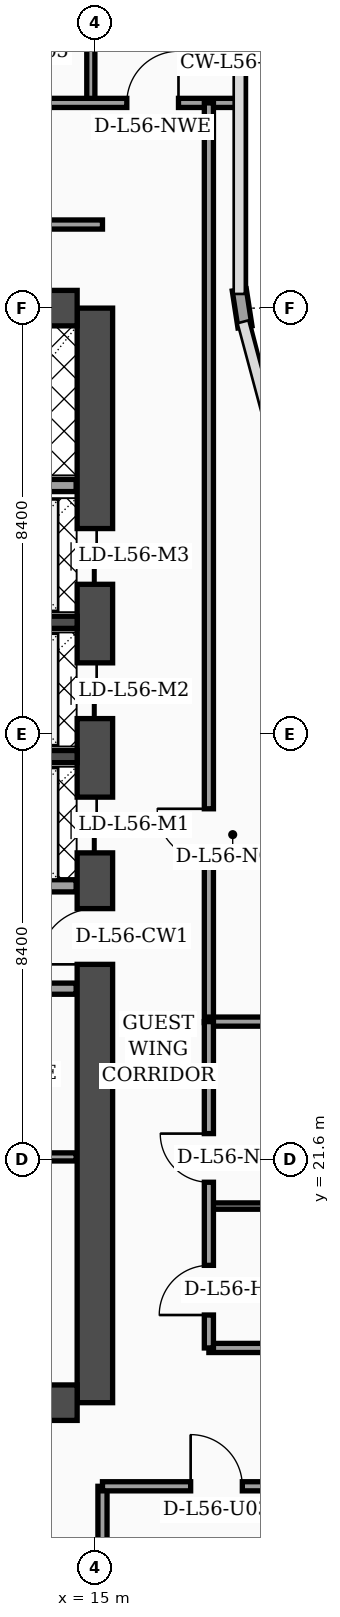
"""IFC4 building model, lengths in metres.
Left out: names, types, materials, properties, quantities, classifications, styles, units other than length and angle.
Written with IfcOpenShell. Run it as: python <this file> out.ifc"""

import sys

from ifc_helpers import new_model, si_unit, direction, frame, frame_2d, origin, place, context, subcontext, project, spatial, rectangle, extrude, element, fill, save


model = new_model("IFC4")
c1 = context("Model", 3, precision=1e-05, world=origin(), true_north=direction((0.0, 1.0)))
c2 = subcontext(c1, "Body", "Model", "MODEL_VIEW")
j1 = project(units=[si_unit("LENGTHUNIT", "METRE"), si_unit("PLANEANGLEUNIT", "RADIAN")], contexts=[c1])
p1 = place(None, origin())
s1 = spatial("IfcSite", under=j1, at=p1, CompositionType="ELEMENT")
p2 = place(p1, origin())
s2 = spatial("IfcBuilding", under=s1, at=p2, CompositionType="ELEMENT")
p3 = place(p2, frame((0.0, 0.0, 226.9)))
s3 = spatial("IfcBuildingStorey", under=s2, at=p3, CompositionType="ELEMENT", Elevation=226.9)
p4 = place(p3, frame((15.0, 16.8, 0.0), z_axis=(0.0, 0.0, 1.0), x_axis=(0.0, 1.0, 0.0)))
e1 = element("IfcWall", 1, at=p4, inside=s3, PredefinedType="SHEAR", context=c2, shape_type="SweptSolid", body=[
    extrude(rectangle(XDim=21.6, YDim=0.7, at=frame_2d((10.8, 0.0))), origin(), (0.0, 0.0, 1.0), 3.56),
])
p5 = place(p4, frame((8.65, 0.0, 0.0)))
e2 = element("IfcOpeningElement", 2, at=p5, cuts=e1, PredefinedType="OPENING", context=c2, shape_type="SweptSolid", body=[
    extrude(rectangle(XDim=1.1, YDim=2.2, at=frame_2d((0.55, 1.1))), frame((0.0, 0.36, 0.0), z_axis=(0.0, -1.0, 0.0), x_axis=(1.0, 0.0, 0.0)), (0.0, 0.0, 1.0), 0.72),
])
p6 = place(p4, frame((10.85, 0.0, 0.0)))
e3 = element("IfcOpeningElement", 3, at=p6, cuts=e1, PredefinedType="OPENING", context=c2, shape_type="SweptSolid", body=[
    extrude(rectangle(XDim=1.1, YDim=2.2, at=frame_2d((0.55, 1.1))), frame((0.0, 0.36, 0.0), z_axis=(0.0, -1.0, 0.0), x_axis=(1.0, 0.0, 0.0)), (0.0, 0.0, 1.0), 0.72),
])
p7 = place(p4, frame((13.5, 0.0, 0.0)))
e4 = element("IfcOpeningElement", 4, at=p7, cuts=e1, PredefinedType="OPENING", context=c2, shape_type="SweptSolid", body=[
    extrude(rectangle(XDim=1.1, YDim=2.2, at=frame_2d((0.55, 1.1))), frame((0.0, 0.36, 0.0), z_axis=(0.0, -1.0, 0.0), x_axis=(1.0, 0.0, 0.0)), (0.0, 0.0, 1.0), 0.72),
])
p8 = place(p4, frame((16.15, 0.0, 0.0)))
e5 = element("IfcOpeningElement", 5, at=p8, cuts=e1, PredefinedType="OPENING", context=c2, shape_type="SweptSolid", body=[
    extrude(rectangle(XDim=1.1, YDim=2.2, at=frame_2d((0.55, 1.1))), frame((0.0, 0.36, 0.0), z_axis=(0.0, -1.0, 0.0), x_axis=(1.0, 0.0, 0.0)), (0.0, 0.0, 1.0), 0.72),
])
for number, where, z_axis, x_axis in (
    (6, (4.55, 38.4, 0.0), (0.0, 0.0, 1.0), (1.0, 0.0, 0.0)),
    (7, (4.55, 16.8, 0.0), (0.0, 0.0, 1.0), (1.0, 0.0, 0.0)),
):
    element("IfcWall", number, at=place(p3, frame(where, z_axis=z_axis, x_axis=x_axis)), inside=s3, PredefinedType="SHEAR", context=c2, shape_type="SweptSolid", body=[
        extrude(rectangle(XDim=10.1, YDim=0.7, at=frame_2d((5.05, 0.0))), origin(), (0.0, 0.0, 1.0), 3.56),
    ])
for number, where, z_axis, x_axis in (
    (8, (12.18, 29.55, 0.0), (0.0, 0.0, 1.0), (1.0, 0.0, 0.0)),
    (9, (12.18, 32.2, 0.0), (0.0, 0.0, 1.0), (1.0, 0.0, 0.0)),
):
    element("IfcWall", number, at=place(p3, frame(where, z_axis=z_axis, x_axis=x_axis)), inside=s3, PredefinedType="SOLIDWALL", context=c2, shape_type="SweptSolid", body=[
        extrude(rectangle(XDim=2.47, YDim=0.24, at=frame_2d((1.235, 0.0))), origin(), (0.0, 0.0, 1.0), 3.56),
    ])
p9 = place(p3, frame((17.962, 38.03, 0.0), z_axis=(0.0, 0.0, 1.0), x_axis=(-0.15141125477, 0.988470855377, 0.0)))
e10 = element("IfcWall", 10, at=p9, inside=s3, PredefinedType="SOLIDWALL", context=c2, shape_type="SweptSolid", body=[
    extrude(rectangle(XDim=0.739, YDim=0.28, at=frame_2d((0.369, 0.0))), origin(), (0.0, 0.0, 1.0), 3.56),
])
p10 = place(p3, frame((9.68, 21.65, 0.0), z_axis=(0.0, 0.0, 1.0), x_axis=(1.0, 0.0, 0.0)))
e11 = element("IfcWall", 11, at=p10, inside=s3, PredefinedType="PARTITIONING", context=c2, shape_type="SweptSolid", body=[
    extrude(rectangle(XDim=4.95, YDim=0.16, at=frame_2d((2.475, 0.0))), origin(), (0.0, 0.0, 1.0), 3.09),
])
p11 = place(p10, frame((1.1, 0.0, 0.0)))
e12 = element("IfcOpeningElement", 12, at=p11, cuts=e11, PredefinedType="OPENING", context=c2, shape_type="SweptSolid", body=[
    extrude(rectangle(XDim=0.98, YDim=2.15, at=frame_2d((0.49, 1.075))), frame((0.0, 0.09, 0.0), z_axis=(0.0, -1.0, 0.0), x_axis=(1.0, 0.0, 0.0)), (0.0, 0.0, 1.0), 0.18),
])
p12 = place(p3, frame((9.68, 24.97, 0.0), z_axis=(0.0, 0.0, 1.0), x_axis=(1.0, 0.0, 0.0)))
e13 = element("IfcWall", 13, at=p12, inside=s3, PredefinedType="SOLIDWALL", context=c2, shape_type="SweptSolid", body=[
    extrude(rectangle(XDim=4.95, YDim=0.22, at=frame_2d((2.475, 0.0))), origin(), (0.0, 0.0, 1.0), 2.94),
])
p13 = place(p12, frame((0.9, 0.0, 0.0)))
e14 = element("IfcOpeningElement", 14, at=p13, cuts=e13, PredefinedType="OPENING", context=c2, shape_type="SweptSolid", body=[
    extrude(rectangle(XDim=0.98, YDim=2.15, at=frame_2d((0.49, 1.075))), frame((0.0, 0.12, 0.0), z_axis=(0.0, -1.0, 0.0), x_axis=(1.0, 0.0, 0.0)), (0.0, 0.0, 1.0), 0.24),
])
p14 = place(p3, frame((12.25, 27.0, 0.0), z_axis=(0.0, 0.0, 1.0), x_axis=(1.0, 0.0, 0.0)))
e15 = element("IfcWall", 15, at=p14, inside=s3, PredefinedType="SOLIDWALL", context=c2, shape_type="SweptSolid", body=[
    extrude(rectangle(XDim=2.38, YDim=0.24, at=frame_2d((1.19, 0.0))), origin(), (0.0, 0.0, 1.0), 3.56),
])
p15 = place(p3, frame((9.66, 34.9, 0.0), z_axis=(0.0, 0.0, 1.0), x_axis=(1.0, 0.0, 0.0)))
e16 = element("IfcWall", 16, at=p15, inside=s3, PredefinedType="SOLIDWALL", context=c2, shape_type="SweptSolid", body=[
    extrude(rectangle(XDim=4.97, YDim=0.24, at=frame_2d((2.485, 0.0))), origin(), (0.0, 0.0, 1.0), 3.56),
])
p16 = place(p3, frame((15.15, 2.44, 0.0), z_axis=(0.0, 0.0, 1.0), x_axis=(0.0, 1.0, 0.0)))
e17 = element("IfcWall", 17, at=p16, inside=s3, PredefinedType="PARTITIONING", context=c2, shape_type="SweptSolid", body=[
    extrude(rectangle(XDim=12.71, YDim=0.18, at=frame_2d((6.355, 0.0))), origin(), (0.0, 0.0, 1.0), 3.09),
])
p17 = place(p3, frame((15.15, 15.15, 0.0), z_axis=(0.0, 0.0, 1.0), x_axis=(1.0, 0.0, 0.0)))
e18 = element("IfcWall", 18, at=p17, inside=s3, PredefinedType="PARTITIONING", context=c2, shape_type="SweptSolid", body=[
    extrude(rectangle(XDim=6.45, YDim=0.18, at=frame_2d((3.225, 0.0))), origin(), (0.0, 0.0, 1.0), 2.59),
])
p18 = place(p17, frame((1.74, 0.0, 0.0)))
e19 = element("IfcOpeningElement", 19, at=p18, cuts=e18, PredefinedType="OPENING", context=c2, shape_type="SweptSolid", body=[
    extrude(rectangle(XDim=1.02, YDim=2.2, at=frame_2d((0.51, 1.1))), frame((0.0, 0.1, 0.0), z_axis=(0.0, -1.0, 0.0), x_axis=(1.0, 0.0, 0.0)), (0.0, 0.0, 1.0), 0.2),
])
p19 = place(p3, frame((14.92, 42.45, 0.0), z_axis=(0.0, 0.0, 1.0), x_axis=(0.0, 1.0, 0.0)))
e20 = element("IfcWall", 20, at=p19, inside=s3, PredefinedType="PARTITIONING", context=c2, shape_type="SweptSolid", body=[
    extrude(rectangle(XDim=5.35, YDim=0.16, at=frame_2d((2.675, 0.0))), origin(), (0.0, 0.0, 1.0), 3.09),
])
p20 = place(p3, frame((0.08, 42.45, 0.0), z_axis=(0.0, 0.0, 1.0), x_axis=(1.0, 0.0, 0.0)))
e21 = element("IfcWall", 21, at=p20, inside=s3, PredefinedType="PARTITIONING", context=c2, shape_type="SweptSolid", body=[
    extrude(rectangle(XDim=17.77, YDim=0.18, at=frame_2d((8.885, 0.0))), origin(), (0.0, 0.0, 1.0), 2.94),
])
p21 = place(p20, frame((0.9, 0.0, 0.0)))
e22 = element("IfcOpeningElement", 22, at=p21, cuts=e21, PredefinedType="OPENING", context=c2, shape_type="SweptSolid", body=[
    extrude(rectangle(XDim=1.02, YDim=2.2, at=frame_2d((0.51, 1.1))), frame((0.0, 0.1, 0.0), z_axis=(0.0, -1.0, 0.0), x_axis=(1.0, 0.0, 0.0)), (0.0, 0.0, 1.0), 0.2),
])
p22 = place(p20, frame((4.75, 0.0, 0.0)))
e23 = element("IfcOpeningElement", 23, at=p22, cuts=e21, PredefinedType="OPENING", context=c2, shape_type="SweptSolid", body=[
    extrude(rectangle(XDim=1.02, YDim=2.2, at=frame_2d((0.51, 1.1))), frame((0.0, 0.1, 0.0), z_axis=(0.0, -1.0, 0.0), x_axis=(1.0, 0.0, 0.0)), (0.0, 0.0, 1.0), 0.2),
])
p23 = place(p20, frame((10.63, 0.0, 0.0)))
e24 = element("IfcOpeningElement", 24, at=p23, cuts=e21, PredefinedType="OPENING", context=c2, shape_type="SweptSolid", body=[
    extrude(rectangle(XDim=1.02, YDim=2.2, at=frame_2d((0.51, 1.1))), frame((0.0, 0.1, 0.0), z_axis=(0.0, -1.0, 0.0), x_axis=(1.0, 0.0, 0.0)), (0.0, 0.0, 1.0), 0.2),
])
p24 = place(p20, frame((15.55, 0.0, 0.0)))
e25 = element("IfcOpeningElement", 25, at=p24, cuts=e21, PredefinedType="OPENING", context=c2, shape_type="SweptSolid", body=[
    extrude(rectangle(XDim=1.02, YDim=2.2, at=frame_2d((0.51, 1.1))), frame((0.0, 0.1, 0.0), z_axis=(0.0, -1.0, 0.0), x_axis=(1.0, 0.0, 0.0)), (0.0, 0.0, 1.0), 0.2),
])
p25 = place(p3, frame((17.25, 24.3, 0.0), z_axis=(0.0, 0.0, 1.0), x_axis=(0.0, 1.0, 0.0)))
e26 = element("IfcWall", 26, at=p25, inside=s3, PredefinedType="PARTITIONING", context=c2, shape_type="SweptSolid", body=[
    extrude(rectangle(XDim=18.15, YDim=0.18, at=frame_2d((9.075, 0.0))), origin(), (0.0, 0.0, 1.0), 2.94),
])
p26 = place(p25, frame((3.2, 0.0, 0.0)))
e27 = element("IfcOpeningElement", 27, at=p26, cuts=e26, PredefinedType="OPENING", context=c2, shape_type="SweptSolid", body=[
    extrude(rectangle(XDim=1.02, YDim=2.2, at=frame_2d((0.51, 1.1))), frame((0.0, 0.1, 0.0), z_axis=(0.0, -1.0, 0.0), x_axis=(1.0, 0.0, 0.0)), (0.0, 0.0, 1.0), 0.2),
])
p27 = place(p3, frame((3.83, 40.05, 0.0), z_axis=(0.0, 0.0, 1.0), x_axis=(1.0, 0.0, 0.0)))
e28 = element("IfcWall", 28, at=p27, inside=s3, PredefinedType="PARTITIONING", context=c2, shape_type="SweptSolid", body=[
    extrude(rectangle(XDim=11.32, YDim=0.18, at=frame_2d((5.66, 0.0))), origin(), (0.0, 0.0, 1.0), 2.94),
])
p28 = place(p3, frame((17.25, 17.88, 0.0), z_axis=(0.0, 0.0, 1.0), x_axis=(1.0, 0.0, 0.0)))
e29 = element("IfcWall", 29, at=p28, inside=s3, PredefinedType="PARTITIONING", context=c2, shape_type="SweptSolid", body=[
    extrude(rectangle(XDim=4.3, YDim=0.18, at=frame_2d((2.15, 0.0))), origin(), (0.0, 0.0, 1.0), 3.56),
])
p29 = place(p3, frame((17.25, 20.68, 0.0), z_axis=(0.0, 0.0, 1.0), x_axis=(1.0, 0.0, 0.0)))
e30 = element("IfcWall", 30, at=p29, inside=s3, PredefinedType="PARTITIONING", context=c2, shape_type="SweptSolid", body=[
    extrude(rectangle(XDim=4.3, YDim=0.125, at=frame_2d((2.15, 0.0))), origin(), (0.0, 0.0, 1.0), 3.56),
])
p30 = place(p3, frame((17.25, 24.32, 0.0), z_axis=(0.0, 0.0, 1.0), x_axis=(1.0, 0.0, 0.0)))
e31 = element("IfcWall", 31, at=p30, inside=s3, PredefinedType="PARTITIONING", context=c2, shape_type="SweptSolid", body=[
    extrude(rectangle(XDim=4.35, YDim=0.18, at=frame_2d((2.175, 0.0))), origin(), (0.0, 0.0, 1.0), 3.56),
])
p31 = place(p3, frame((17.25, 17.88, 0.0), z_axis=(0.0, 0.0, 1.0), x_axis=(0.0, 1.0, 0.0)))
e32 = element("IfcWall", 32, at=p31, inside=s3, PredefinedType="PARTITIONING", context=c2, shape_type="SweptSolid", body=[
    extrude(rectangle(XDim=6.44, YDim=0.18, at=frame_2d((3.22, 0.0))), origin(), (0.0, 0.0, 1.0), 3.09),
])
p32 = place(p31, frame((0.65, 0.0, 0.0)))
e33 = element("IfcOpeningElement", 33, at=p32, cuts=e32, PredefinedType="OPENING", context=c2, shape_type="SweptSolid", body=[
    extrude(rectangle(XDim=0.98, YDim=2.15, at=frame_2d((0.49, 1.075))), frame((0.0, 0.1, 0.0), z_axis=(0.0, -1.0, 0.0), x_axis=(1.0, 0.0, 0.0)), (0.0, 0.0, 1.0), 0.2),
])
p33 = place(p31, frame((3.27, 0.0, 0.0)))
e34 = element("IfcOpeningElement", 34, at=p33, cuts=e32, PredefinedType="OPENING", context=c2, shape_type="SweptSolid", body=[
    extrude(rectangle(XDim=0.96, YDim=2.2, at=frame_2d((0.48, 1.1))), frame((0.0, 0.1, 0.0), z_axis=(0.0, -1.0, 0.0), x_axis=(1.0, 0.0, 0.0)), (0.0, 0.0, 1.0), 0.2),
])
p34 = place(p18, origin())
e35 = element("IfcDoor", 35, at=p34, inside=s3, OperationType="SINGLE_SWING_LEFT", PredefinedType="DOOR", context=c2, shape_type="SweptSolid", body=[
    extrude(rectangle(XDim=1.02, YDim=2.2, at=frame_2d((0.51, 1.1))), frame((0.0, 0.025, 0.0), z_axis=(0.0, -1.0, 0.0), x_axis=(1.0, 0.0, 0.0)), (0.0, 0.0, 1.0), 0.05),
])
fill(e19, e35)
p35 = place(p24, origin())
e36 = element("IfcDoor", 36, at=p35, inside=s3, OperationType="SINGLE_SWING_RIGHT", PredefinedType="DOOR", context=c2, shape_type="SweptSolid", body=[
    extrude(rectangle(XDim=1.02, YDim=2.2, at=frame_2d((0.51, 1.1))), frame((0.0, 0.025, 0.0), z_axis=(0.0, -1.0, 0.0), x_axis=(1.0, 0.0, 0.0)), (0.0, 0.0, 1.0), 0.05),
])
fill(e25, e36)
p36 = place(p26, origin())
e37 = element("IfcDoor", 37, at=p36, inside=s3, OperationType="SINGLE_SWING_RIGHT", PredefinedType="DOOR", context=c2, shape_type="SweptSolid", body=[
    extrude(rectangle(XDim=1.02, YDim=2.2, at=frame_2d((0.51, 1.1))), frame((0.0, 0.025, 0.0), z_axis=(0.0, -1.0, 0.0), x_axis=(1.0, 0.0, 0.0)), (0.0, 0.0, 1.0), 0.05),
])
fill(e27, e37)
p37 = place(p32, origin())
e38 = element("IfcDoor", 38, at=p37, inside=s3, OperationType="SINGLE_SWING_LEFT", PredefinedType="DOOR", context=c2, shape_type="SweptSolid", body=[
    extrude(rectangle(XDim=0.98, YDim=2.15, at=frame_2d((0.49, 1.075))), frame((0.0, 0.025, 0.0), z_axis=(0.0, -1.0, 0.0), x_axis=(1.0, 0.0, 0.0)), (0.0, 0.0, 1.0), 0.05),
])
fill(e33, e38)
p38 = place(p33, origin())
e39 = element("IfcDoor", 39, at=p38, inside=s3, OperationType="SINGLE_SWING_RIGHT", PredefinedType="DOOR", context=c2, shape_type="SweptSolid", body=[
    extrude(rectangle(XDim=0.96, YDim=2.2, at=frame_2d((0.48, 1.1))), frame((0.0, 0.025, 0.0), z_axis=(0.0, -1.0, 0.0), x_axis=(1.0, 0.0, 0.0)), (0.0, 0.0, 1.0), 0.05),
])
fill(e34, e39)
p39 = place(p5, origin())
e40 = element("IfcDoor", 40, at=p39, inside=s3, OperationType="SINGLE_SWING_LEFT", PredefinedType="DOOR", context=c2, shape_type="SweptSolid", body=[
    extrude(rectangle(XDim=1.1, YDim=2.2, at=frame_2d((0.55, 1.1))), frame((0.0, 0.025, 0.0), z_axis=(0.0, -1.0, 0.0), x_axis=(1.0, 0.0, 0.0)), (0.0, 0.0, 1.0), 0.05),
])
fill(e2, e40)
p40 = place(p6, origin())
e41 = element("IfcDoor", 41, at=p40, inside=s3, OperationType="DOUBLE_DOOR_SLIDING", PredefinedType="DOOR", context=c2, shape_type="SweptSolid", body=[
    extrude(rectangle(XDim=1.1, YDim=2.2, at=frame_2d((0.55, 1.1))), frame((0.0, 0.025, 0.0), z_axis=(0.0, -1.0, 0.0), x_axis=(1.0, 0.0, 0.0)), (0.0, 0.0, 1.0), 0.05),
])
fill(e3, e41)
p41 = place(p7, origin())
e42 = element("IfcDoor", 42, at=p41, inside=s3, OperationType="DOUBLE_DOOR_SLIDING", PredefinedType="DOOR", context=c2, shape_type="SweptSolid", body=[
    extrude(rectangle(XDim=1.1, YDim=2.2, at=frame_2d((0.55, 1.1))), frame((0.0, 0.025, 0.0), z_axis=(0.0, -1.0, 0.0), x_axis=(1.0, 0.0, 0.0)), (0.0, 0.0, 1.0), 0.05),
])
fill(e4, e42)
p42 = place(p8, origin())
e43 = element("IfcDoor", 43, at=p42, inside=s3, OperationType="DOUBLE_DOOR_SLIDING", PredefinedType="DOOR", context=c2, shape_type="SweptSolid", body=[
    extrude(rectangle(XDim=1.1, YDim=2.2, at=frame_2d((0.55, 1.1))), frame((0.0, 0.025, 0.0), z_axis=(0.0, -1.0, 0.0), x_axis=(1.0, 0.0, 0.0)), (0.0, 0.0, 1.0), 0.05),
])
fill(e5, e43)
save(model, sys.argv[1])
